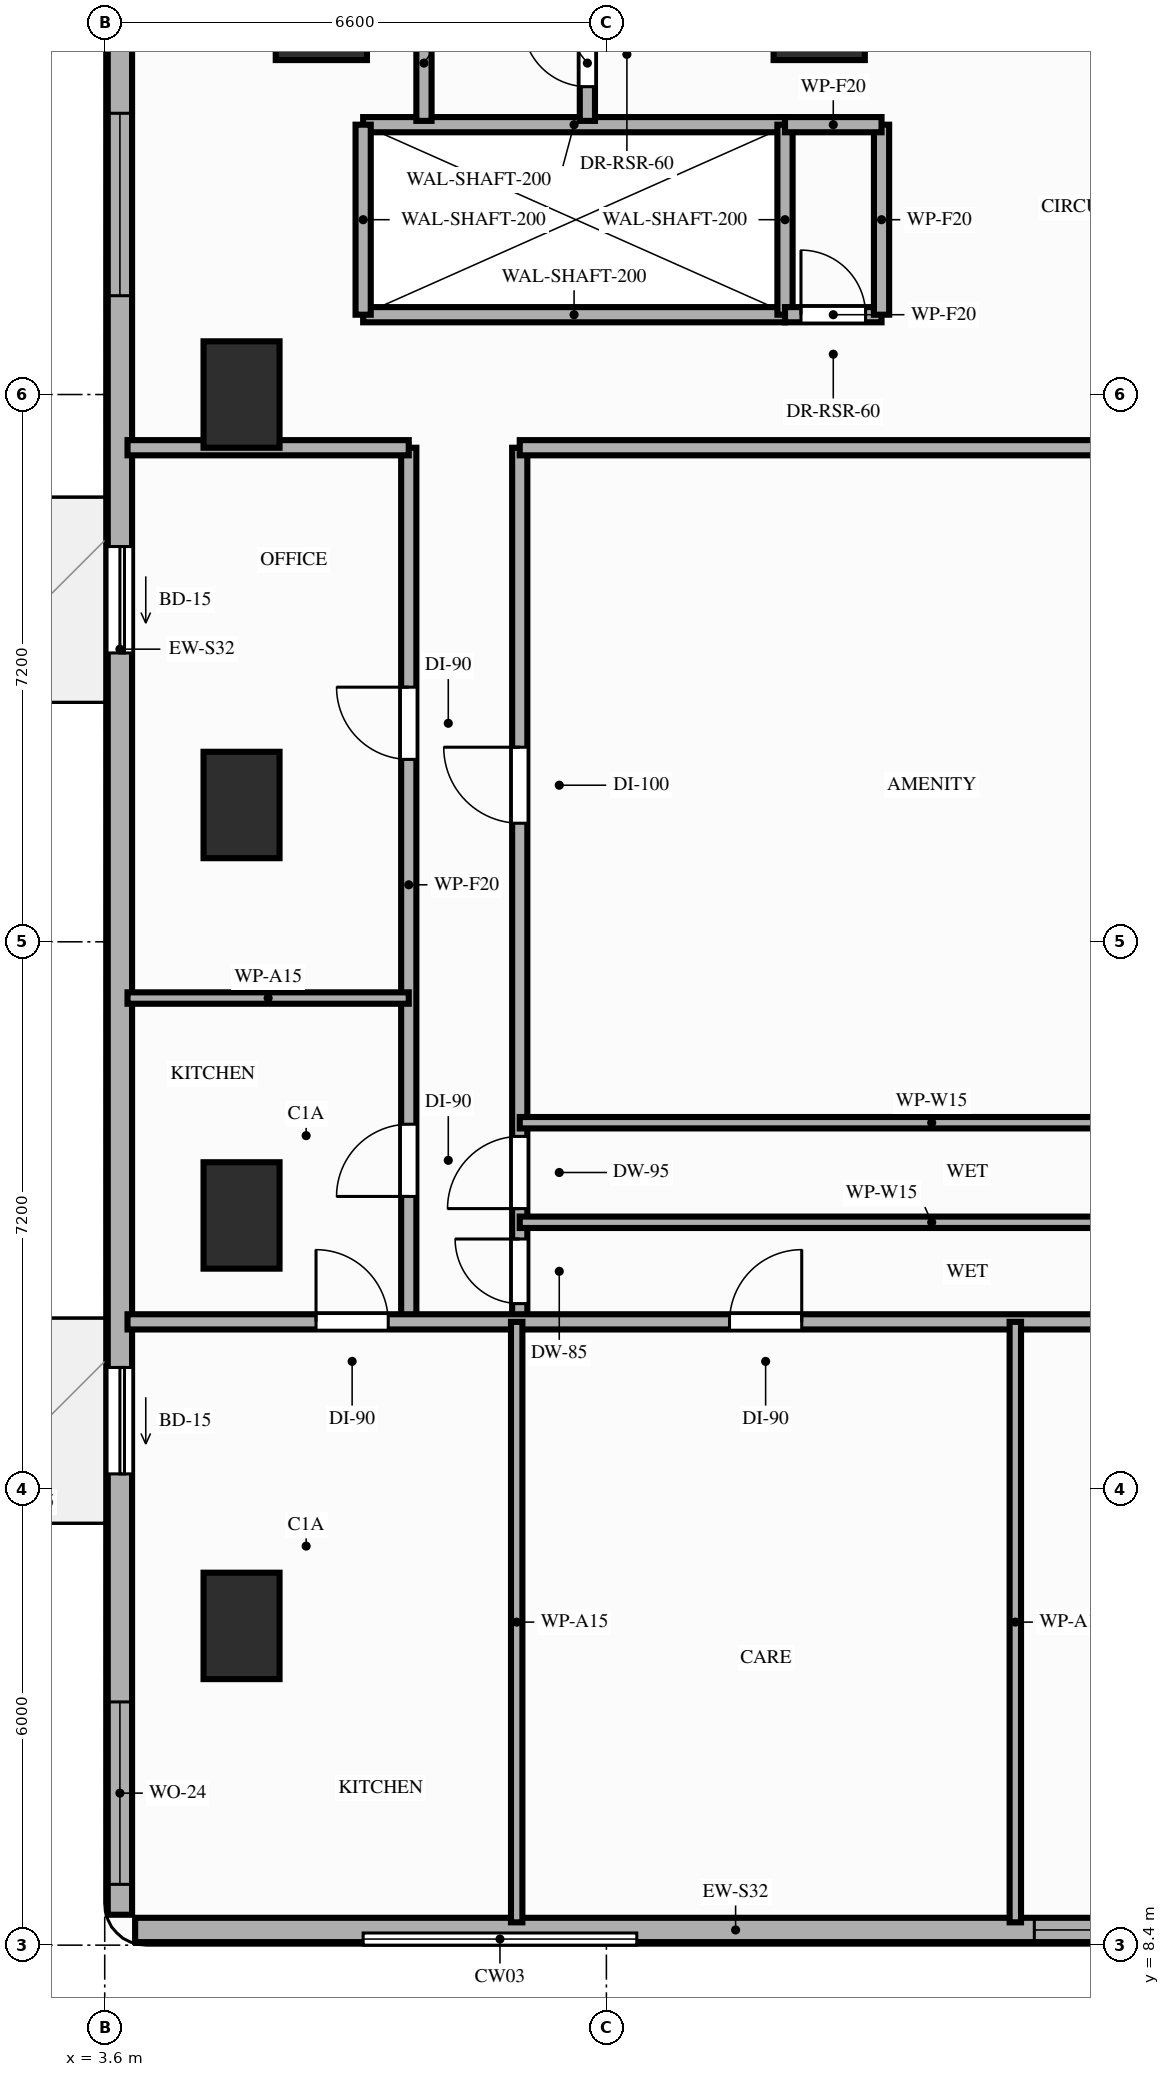
"""IFC4 building model, lengths in metres.
Left out: names, types, materials, properties, quantities, classifications, styles, units other than length and angle.
Written with IfcOpenShell. Run it as: python <this file> out.ifc"""

import sys

from ifc_helpers import new_model, si_unit, direction, frame, frame_2d, origin, origin_2d, place, context, subcontext, project, spatial, rectangle, extrude, element, fill, save


model = new_model("IFC4")
c1 = context("Model", 3, precision=1e-05, world=origin(), true_north=direction((0.0, 1.0)))
c2 = subcontext(c1, "Body", "Model", "MODEL_VIEW")
j1 = project(units=[si_unit("LENGTHUNIT", "METRE"), si_unit("PLANEANGLEUNIT", "RADIAN")], contexts=[c1])
p1 = place(None, origin())
s1 = spatial("IfcSite", under=j1, at=p1, CompositionType="ELEMENT")
p2 = place(p1, origin())
s2 = spatial("IfcBuilding", under=s1, at=p2, CompositionType="ELEMENT")
p3 = place(p2, frame((0.0, 0.0, 59.6)))
s3 = spatial("IfcBuildingStorey", under=s2, at=p3, CompositionType="ELEMENT", Elevation=59.6)
for number, where, z_axis, x_axis in (
    (1, (6.45, 33.8, 0.0), (0.0, 0.0, 1.0), (1.0, 0.0, 0.0)),
    (2, (13.0, 33.8, 0.0), (0.0, 0.0, 1.0), (1.0, 0.0, 0.0)),
):
    element("IfcColumn", number, at=place(p3, frame(where, z_axis=z_axis, x_axis=x_axis)), inside=s3, PredefinedType="COLUMN", context=c2, shape_type="SweptSolid", body=[
        extrude(rectangle(XDim=1.2, YDim=1.2, at=origin_2d()), origin(), (0.0, 0.0, 1.0), 3.2),
    ])
for number, where, z_axis, x_axis in (
    (3, (5.4, 12.6, 0.0), (0.0, 0.0, 1.0), (1.0, 0.0, 0.0)),
    (4, (5.4, 18.0, 0.0), (0.0, 0.0, 1.0), (1.0, 0.0, 0.0)),
    (5, (5.4, 23.4, 0.0), (0.0, 0.0, 1.0), (1.0, 0.0, 0.0)),
    (6, (5.4, 28.8, 0.0), (0.0, 0.0, 1.0), (1.0, 0.0, 0.0)),
):
    element("IfcColumn", number, at=place(p3, frame(where, z_axis=z_axis, x_axis=x_axis)), inside=s3, PredefinedType="COLUMN", context=c2, shape_type="SweptSolid", body=[
        extrude(rectangle(XDim=1.0, YDim=1.4, at=origin_2d()), origin(), (0.0, 0.0, 1.0), 3.2),
    ])
p4 = place(p3, frame((4.0, 8.6, 0.0), z_axis=(0.0, 0.0, 1.0), x_axis=(1.0, 0.0, 0.0)))
e7 = element("IfcWall", 7, at=p4, inside=s3, PredefinedType="STANDARD", context=c2, shape_type="SweptSolid", body=[
    extrude(rectangle(XDim=15.8, YDim=0.32, at=frame_2d((7.9, 0.0))), origin(), (0.0, 0.0, 1.0), 3.02),
])
p5 = place(p4, frame((11.83, 0.0, 0.85)))
e8 = element("IfcOpeningElement", 8, at=p5, cuts=e7, PredefinedType="OPENING", context=c2, shape_type="SweptSolid", body=[
    extrude(rectangle(XDim=2.4, YDim=1.8, at=frame_2d((1.2, 0.9))), frame((0.0, 0.17, 0.0), z_axis=(0.0, -1.0, 0.0), x_axis=(1.0, 0.0, 0.0)), (0.0, 0.0, 1.0), 0.34),
])
p6 = place(p3, frame((3.8, 42.1, 0.0), z_axis=(0.0, 0.0, 1.0), x_axis=(0.0, -1.0, 0.0)))
e9 = element("IfcWall", 9, at=p6, inside=s3, PredefinedType="STANDARD", context=c2, shape_type="SweptSolid", body=[
    extrude(rectangle(XDim=33.3, YDim=0.32, at=frame_2d((16.65, 0.0))), origin(), (0.0, 0.0, 1.0), 2.7),
])
p7 = place(p6, frame((26.1, 0.0, 0.0)))
e10 = element("IfcOpeningElement", 10, at=p7, cuts=e9, PredefinedType="OPENING", context=c2, shape_type="SweptSolid", body=[
    extrude(rectangle(XDim=1.4, YDim=2.1, at=frame_2d((0.7, 1.05))), frame((0.0, 0.17, 0.0), z_axis=(0.0, -1.0, 0.0), x_axis=(1.0, 0.0, 0.0)), (0.0, 0.0, 1.0), 0.34),
])
p8 = place(p6, frame((15.3, 0.0, 0.0)))
e11 = element("IfcOpeningElement", 11, at=p8, cuts=e9, PredefinedType="OPENING", context=c2, shape_type="SweptSolid", body=[
    extrude(rectangle(XDim=1.4, YDim=2.1, at=frame_2d((0.7, 1.05))), frame((0.0, 0.17, 0.0), z_axis=(0.0, -1.0, 0.0), x_axis=(1.0, 0.0, 0.0)), (0.0, 0.0, 1.0), 0.34),
])
p9 = place(p6, frame((30.5, 0.0, 0.85)))
e12 = element("IfcOpeningElement", 12, at=p9, cuts=e9, PredefinedType="OPENING", context=c2, shape_type="SweptSolid", body=[
    extrude(rectangle(XDim=2.4, YDim=1.6, at=frame_2d((1.2, 0.8))), frame((0.0, 0.17, 0.0), z_axis=(0.0, -1.0, 0.0), x_axis=(1.0, 0.0, 0.0)), (0.0, 0.0, 1.0), 0.34),
])
p10 = place(p6, frame((9.6, 0.0, 0.85)))
e13 = element("IfcOpeningElement", 13, at=p10, cuts=e9, PredefinedType="OPENING", context=c2, shape_type="SweptSolid", body=[
    extrude(rectangle(XDim=2.4, YDim=1.6, at=frame_2d((1.2, 0.8))), frame((0.0, 0.17, 0.0), z_axis=(0.0, -1.0, 0.0), x_axis=(1.0, 0.0, 0.0)), (0.0, 0.0, 1.0), 0.34),
])
p11 = place(p6, frame((3.5, 0.0, 0.85)))
e14 = element("IfcOpeningElement", 14, at=p11, cuts=e9, PredefinedType="OPENING", context=c2, shape_type="SweptSolid", body=[
    extrude(rectangle(XDim=2.4, YDim=1.6, at=frame_2d((1.2, 0.8))), frame((0.0, 0.17, 0.0), z_axis=(0.0, -1.0, 0.0), x_axis=(1.0, 0.0, 0.0)), (0.0, 0.0, 1.0), 0.34),
])
for number, where, z_axis, x_axis in (
    (15, (7.0, 29.85, 0.0), (0.0, 0.0, 1.0), (1.0, 0.0, 0.0)),
    (16, (7.0, 32.35, 0.0), (0.0, 0.0, 1.0), (1.0, 0.0, 0.0)),
):
    element("IfcWall", number, at=place(p3, frame(where, z_axis=z_axis, x_axis=x_axis)), inside=s3, PredefinedType="MOVABLE", context=c2, shape_type="SweptSolid", body=[
        extrude(rectangle(XDim=5.55, YDim=0.2, at=frame_2d((2.775, 0.0))), origin(), (0.0, 0.0, 1.0), 3.02),
    ])
for number, where, z_axis, x_axis in (
    (17, (7.0, 29.85, 0.0), (0.0, 0.0, 1.0), (0.0, 1.0, 0.0)),
    (18, (12.55, 29.85, 0.0), (0.0, 0.0, 1.0), (0.0, 1.0, 0.0)),
):
    element("IfcWall", number, at=place(p3, frame(where, z_axis=z_axis, x_axis=x_axis)), inside=s3, PredefinedType="MOVABLE", context=c2, shape_type="SweptSolid", body=[
        extrude(rectangle(XDim=2.5, YDim=0.2, at=frame_2d((1.25, 0.0))), origin(), (0.0, 0.0, 1.0), 3.02),
    ])
p12 = place(p3, frame((12.55, 29.85, 0.0), z_axis=(0.0, 0.0, 1.0), x_axis=(1.0, 0.0, 0.0)))
e19 = element("IfcWall", 19, at=p12, inside=s3, PredefinedType="PARTITIONING", context=c2, shape_type="SweptSolid", body=[
    extrude(rectangle(XDim=1.27, YDim=0.2, at=frame_2d((0.635, 0.0))), origin(), (0.0, 0.0, 1.0), 3.02),
])
p13 = place(p12, frame((0.21, 0.0, 0.0)))
e20 = element("IfcOpeningElement", 20, at=p13, cuts=e19, PredefinedType="OPENING", context=c2, shape_type="SweptSolid", body=[
    extrude(rectangle(XDim=0.85, YDim=2.05, at=frame_2d((0.425, 1.025))), frame((0.0, 0.11, 0.0), z_axis=(0.0, -1.0, 0.0), x_axis=(1.0, 0.0, 0.0)), (0.0, 0.0, 1.0), 0.22),
])
p14 = place(p3, frame((13.82, 29.85, 0.0), z_axis=(0.0, 0.0, 1.0), x_axis=(0.0, 1.0, 0.0)))
e21 = element("IfcWall", 21, at=p14, inside=s3, PredefinedType="PARTITIONING", context=c2, shape_type="SweptSolid", body=[
    extrude(rectangle(XDim=2.5, YDim=0.2, at=frame_2d((1.25, 0.0))), origin(), (0.0, 0.0, 1.0), 3.02),
])
p15 = place(p3, frame((12.55, 32.35, 0.0), z_axis=(0.0, 0.0, 1.0), x_axis=(1.0, 0.0, 0.0)))
e22 = element("IfcWall", 22, at=p15, inside=s3, PredefinedType="PARTITIONING", context=c2, shape_type="SweptSolid", body=[
    extrude(rectangle(XDim=1.27, YDim=0.2, at=frame_2d((0.635, 0.0))), origin(), (0.0, 0.0, 1.0), 3.02),
])
p16 = place(p3, frame((7.8, 32.4, 0.0), z_axis=(0.0, 0.0, 1.0), x_axis=(0.0, 1.0, 0.0)))
e23 = element("IfcWall", 23, at=p16, inside=s3, PredefinedType="PARTITIONING", context=c2, shape_type="SweptSolid", body=[
    extrude(rectangle(XDim=1.52, YDim=0.2, at=frame_2d((0.76, 0.0))), origin(), (0.0, 0.0, 1.0), 2.41),
])
p17 = place(p3, frame((9.95, 32.4, 0.0), z_axis=(0.0, 0.0, 1.0), x_axis=(0.0, 1.0, 0.0)))
e24 = element("IfcWall", 24, at=p17, inside=s3, PredefinedType="PARTITIONING", context=c2, shape_type="SweptSolid", body=[
    extrude(rectangle(XDim=1.52, YDim=0.2, at=frame_2d((0.76, 0.0))), origin(), (0.0, 0.0, 1.0), 2.41),
])
p18 = place(p17, frame((0.45, 0.0, 0.0)))
e25 = element("IfcOpeningElement", 25, at=p18, cuts=e24, PredefinedType="OPENING", context=c2, shape_type="SweptSolid", body=[
    extrude(rectangle(XDim=0.85, YDim=2.05, at=frame_2d((0.425, 1.025))), frame((0.0, 0.11, 0.0), z_axis=(0.0, -1.0, 0.0), x_axis=(1.0, 0.0, 0.0)), (0.0, 0.0, 1.0), 0.22),
])
p19 = place(p3, frame((7.6, 16.6, 0.0), z_axis=(0.0, 0.0, 1.0), x_axis=(0.0, 1.0, 0.0)))
e26 = element("IfcWall", 26, at=p19, inside=s3, PredefinedType="PARTITIONING", context=c2, shape_type="SweptSolid", body=[
    extrude(rectangle(XDim=11.5, YDim=0.2, at=frame_2d((5.75, 0.0))), origin(), (0.0, 0.0, 1.0), 2.41),
])
p20 = place(p19, frame((1.65, 0.0, 0.0)))
e27 = element("IfcOpeningElement", 27, at=p20, cuts=e26, PredefinedType="OPENING", context=c2, shape_type="SweptSolid", body=[
    extrude(rectangle(XDim=0.95, YDim=2.15, at=frame_2d((0.475, 1.075))), frame((0.0, 0.11, 0.0), z_axis=(0.0, -1.0, 0.0), x_axis=(1.0, 0.0, 0.0)), (0.0, 0.0, 1.0), 0.22),
])
p21 = place(p19, frame((7.4, 0.0, 0.0)))
e28 = element("IfcOpeningElement", 28, at=p21, cuts=e26, PredefinedType="OPENING", context=c2, shape_type="SweptSolid", body=[
    extrude(rectangle(XDim=0.95, YDim=2.15, at=frame_2d((0.475, 1.075))), frame((0.0, 0.11, 0.0), z_axis=(0.0, -1.0, 0.0), x_axis=(1.0, 0.0, 0.0)), (0.0, 0.0, 1.0), 0.22),
])
p22 = place(p3, frame((9.06, 16.6, 0.0), z_axis=(0.0, 0.0, 1.0), x_axis=(0.0, 1.0, 0.0)))
e29 = element("IfcWall", 29, at=p22, inside=s3, PredefinedType="PARTITIONING", context=c2, shape_type="SweptSolid", body=[
    extrude(rectangle(XDim=11.5, YDim=0.2, at=frame_2d((5.75, 0.0))), origin(), (0.0, 0.0, 1.0), 2.41),
])
p23 = place(p22, frame((0.24, 0.0, 0.0)))
e30 = element("IfcOpeningElement", 30, at=p23, cuts=e29, PredefinedType="OPENING", context=c2, shape_type="SweptSolid", body=[
    extrude(rectangle(XDim=0.85, YDim=2.1, at=frame_2d((0.425, 1.05))), frame((0.0, 0.11, 0.0), z_axis=(0.0, -1.0, 0.0), x_axis=(1.0, 0.0, 0.0)), (0.0, 0.0, 1.0), 0.22),
])
p24 = place(p22, frame((1.49, 0.0, 0.0)))
e31 = element("IfcOpeningElement", 31, at=p24, cuts=e29, PredefinedType="OPENING", context=c2, shape_type="SweptSolid", body=[
    extrude(rectangle(XDim=0.95, YDim=2.1, at=frame_2d((0.475, 1.05))), frame((0.0, 0.11, 0.0), z_axis=(0.0, -1.0, 0.0), x_axis=(1.0, 0.0, 0.0)), (0.0, 0.0, 1.0), 0.22),
])
p25 = place(p22, frame((6.56, 0.0, 0.0)))
e32 = element("IfcOpeningElement", 32, at=p25, cuts=e29, PredefinedType="OPENING", context=c2, shape_type="SweptSolid", body=[
    extrude(rectangle(XDim=1.0, YDim=2.15, at=frame_2d((0.5, 1.075))), frame((0.0, 0.11, 0.0), z_axis=(0.0, -1.0, 0.0), x_axis=(1.0, 0.0, 0.0)), (0.0, 0.0, 1.0), 0.22),
])
p26 = place(p3, frame((3.9, 16.6, 0.0), z_axis=(0.0, 0.0, 1.0), x_axis=(1.0, 0.0, 0.0)))
e33 = element("IfcWall", 33, at=p26, inside=s3, PredefinedType="PARTITIONING", context=c2, shape_type="SweptSolid", body=[
    extrude(rectangle(XDim=16.0, YDim=0.2, at=frame_2d((8.0, 0.0))), origin(), (0.0, 0.0, 1.0), 2.41),
])
p27 = place(p26, frame((2.48, 0.0, 0.0)))
e34 = element("IfcOpeningElement", 34, at=p27, cuts=e33, PredefinedType="OPENING", context=c2, shape_type="SweptSolid", body=[
    extrude(rectangle(XDim=0.95, YDim=2.15, at=frame_2d((0.475, 1.075))), frame((0.0, 0.11, 0.0), z_axis=(0.0, -1.0, 0.0), x_axis=(1.0, 0.0, 0.0)), (0.0, 0.0, 1.0), 0.22),
])
p28 = place(p26, frame((7.92, 0.0, 0.0)))
e35 = element("IfcOpeningElement", 35, at=p28, cuts=e33, PredefinedType="OPENING", context=c2, shape_type="SweptSolid", body=[
    extrude(rectangle(XDim=0.95, YDim=2.15, at=frame_2d((0.475, 1.075))), frame((0.0, 0.11, 0.0), z_axis=(0.0, -1.0, 0.0), x_axis=(1.0, 0.0, 0.0)), (0.0, 0.0, 1.0), 0.22),
])
p29 = place(p26, frame((13.36, 0.0, 0.0)))
e36 = element("IfcOpeningElement", 36, at=p29, cuts=e33, PredefinedType="OPENING", context=c2, shape_type="SweptSolid", body=[
    extrude(rectangle(XDim=0.95, YDim=2.15, at=frame_2d((0.475, 1.075))), frame((0.0, 0.11, 0.0), z_axis=(0.0, -1.0, 0.0), x_axis=(1.0, 0.0, 0.0)), (0.0, 0.0, 1.0), 0.22),
])
p30 = place(p3, frame((3.9, 28.1, 0.0), z_axis=(0.0, 0.0, 1.0), x_axis=(1.0, 0.0, 0.0)))
e37 = element("IfcWall", 37, at=p30, inside=s3, PredefinedType="PARTITIONING", context=c2, shape_type="SweptSolid", body=[
    extrude(rectangle(XDim=3.7, YDim=0.2, at=frame_2d((1.85, 0.0))), origin(), (0.0, 0.0, 1.0), 2.41),
])
p31 = place(p3, frame((9.06, 28.1, 0.0), z_axis=(0.0, 0.0, 1.0), x_axis=(1.0, 0.0, 0.0)))
e38 = element("IfcWall", 38, at=p31, inside=s3, PredefinedType="PARTITIONING", context=c2, shape_type="SweptSolid", body=[
    extrude(rectangle(XDim=10.84, YDim=0.2, at=frame_2d((5.42, 0.0))), origin(), (0.0, 0.0, 1.0), 2.41),
])
p32 = place(p3, frame((3.9, 20.86, 0.0), z_axis=(0.0, 0.0, 1.0), x_axis=(1.0, 0.0, 0.0)))
e39 = element("IfcWall", 39, at=p32, inside=s3, PredefinedType="PARTITIONING", context=c2, shape_type="SweptSolid", body=[
    extrude(rectangle(XDim=3.7, YDim=0.15, at=frame_2d((1.85, 0.0))), origin(), (0.0, 0.0, 1.0), 2.41),
])
for number, where, z_axis, x_axis in (
    (40, (9.02, 8.7, 0.0), (0.0, 0.0, 1.0), (0.0, 1.0, 0.0)),
    (41, (15.58, 8.7, 0.0), (0.0, 0.0, 1.0), (0.0, 1.0, 0.0)),
):
    element("IfcWall", number, at=place(p3, frame(where, z_axis=z_axis, x_axis=x_axis)), inside=s3, PredefinedType="PARTITIONING", context=c2, shape_type="SweptSolid", body=[
        extrude(rectangle(XDim=7.9, YDim=0.15, at=frame_2d((3.95, 0.0))), origin(), (0.0, 0.0, 1.0), 2.41),
    ])
for number, where, z_axis, x_axis in (
    (42, (9.06, 17.91, 0.0), (0.0, 0.0, 1.0), (1.0, 0.0, 0.0)),
    (43, (9.06, 19.22, 0.0), (0.0, 0.0, 1.0), (1.0, 0.0, 0.0)),
):
    element("IfcWall", number, at=place(p3, frame(where, z_axis=z_axis, x_axis=x_axis)), inside=s3, PredefinedType="PARTITIONING", context=c2, shape_type="SweptSolid", body=[
        extrude(rectangle(XDim=10.84, YDim=0.15, at=frame_2d((5.42, 0.0))), origin(), (0.0, 0.0, 1.0), 2.41),
    ])
p33 = place(p7, origin())
e44 = element("IfcDoor", 44, at=p33, inside=s3, OperationType="SLIDING_TO_RIGHT", PredefinedType="DOOR", context=c2, shape_type="SweptSolid", body=[
    extrude(rectangle(XDim=1.4, YDim=2.1, at=frame_2d((0.7, 1.05))), frame((0.0, 0.025, 0.0), z_axis=(0.0, -1.0, 0.0), x_axis=(1.0, 0.0, 0.0)), (0.0, 0.0, 1.0), 0.05),
])
fill(e10, e44)
p34 = place(p8, origin())
e45 = element("IfcDoor", 45, at=p34, inside=s3, OperationType="SLIDING_TO_RIGHT", PredefinedType="DOOR", context=c2, shape_type="SweptSolid", body=[
    extrude(rectangle(XDim=1.4, YDim=2.1, at=frame_2d((0.7, 1.05))), frame((0.0, 0.025, 0.0), z_axis=(0.0, -1.0, 0.0), x_axis=(1.0, 0.0, 0.0)), (0.0, 0.0, 1.0), 0.05),
])
fill(e11, e45)
p35 = place(p9, origin())
e46 = element("IfcWindow", 46, at=p35, inside=s3, PartitioningType="SINGLE_PANEL", PredefinedType="WINDOW", context=c2, shape_type="SweptSolid", body=[
    extrude(rectangle(XDim=2.4, YDim=1.6, at=frame_2d((1.2, 0.8))), frame((0.0, 0.03, 0.0), z_axis=(0.0, -1.0, 0.0), x_axis=(1.0, 0.0, 0.0)), (0.0, 0.0, 1.0), 0.06),
])
fill(e12, e46)
p36 = place(p10, origin())
e47 = element("IfcWindow", 47, at=p36, inside=s3, PartitioningType="SINGLE_PANEL", PredefinedType="WINDOW", context=c2, shape_type="SweptSolid", body=[
    extrude(rectangle(XDim=2.4, YDim=1.6, at=frame_2d((1.2, 0.8))), frame((0.0, 0.03, 0.0), z_axis=(0.0, -1.0, 0.0), x_axis=(1.0, 0.0, 0.0)), (0.0, 0.0, 1.0), 0.06),
])
fill(e13, e47)
p37 = place(p5, origin())
e48 = element("IfcWindow", 48, at=p37, inside=s3, PartitioningType="SINGLE_PANEL", PredefinedType="WINDOW", context=c2, shape_type="SweptSolid", body=[
    extrude(rectangle(XDim=2.4, YDim=1.8, at=frame_2d((1.2, 0.9))), frame((0.0, 0.03, 0.0), z_axis=(0.0, -1.0, 0.0), x_axis=(1.0, 0.0, 0.0)), (0.0, 0.0, 1.0), 0.06),
])
fill(e8, e48)
p38 = place(p13, origin())
e49 = element("IfcDoor", 49, at=p38, inside=s3, OperationType="SINGLE_SWING_LEFT", PredefinedType="DOOR", context=c2, shape_type="SweptSolid", body=[
    extrude(rectangle(XDim=0.85, YDim=2.05, at=frame_2d((0.425, 1.025))), frame((0.0, 0.025, 0.0), z_axis=(0.0, -1.0, 0.0), x_axis=(1.0, 0.0, 0.0)), (0.0, 0.0, 1.0), 0.05),
])
fill(e20, e49)
p39 = place(p18, origin())
e50 = element("IfcDoor", 50, at=p39, inside=s3, OperationType="SINGLE_SWING_RIGHT", PredefinedType="DOOR", context=c2, shape_type="SweptSolid", body=[
    extrude(rectangle(XDim=0.85, YDim=2.05, at=frame_2d((0.425, 1.025))), frame((0.0, 0.025, 0.0), z_axis=(0.0, -1.0, 0.0), x_axis=(1.0, 0.0, 0.0)), (0.0, 0.0, 1.0), 0.05),
])
fill(e25, e50)
p40 = place(p20, origin())
e51 = element("IfcDoor", 51, at=p40, inside=s3, OperationType="SINGLE_SWING_LEFT", PredefinedType="DOOR", context=c2, shape_type="SweptSolid", body=[
    extrude(rectangle(XDim=0.95, YDim=2.15, at=frame_2d((0.475, 1.075))), frame((0.0, 0.025, 0.0), z_axis=(0.0, -1.0, 0.0), x_axis=(1.0, 0.0, 0.0)), (0.0, 0.0, 1.0), 0.05),
])
fill(e27, e51)
p41 = place(p21, origin())
e52 = element("IfcDoor", 52, at=p41, inside=s3, OperationType="SINGLE_SWING_RIGHT", PredefinedType="DOOR", context=c2, shape_type="SweptSolid", body=[
    extrude(rectangle(XDim=0.95, YDim=2.15, at=frame_2d((0.475, 1.075))), frame((0.0, 0.025, 0.0), z_axis=(0.0, -1.0, 0.0), x_axis=(1.0, 0.0, 0.0)), (0.0, 0.0, 1.0), 0.05),
])
fill(e28, e52)
p42 = place(p27, origin())
e53 = element("IfcDoor", 53, at=p42, inside=s3, OperationType="SINGLE_SWING_LEFT", PredefinedType="DOOR", context=c2, shape_type="SweptSolid", body=[
    extrude(rectangle(XDim=0.95, YDim=2.15, at=frame_2d((0.475, 1.075))), frame((0.0, 0.025, 0.0), z_axis=(0.0, -1.0, 0.0), x_axis=(1.0, 0.0, 0.0)), (0.0, 0.0, 1.0), 0.05),
])
fill(e34, e53)
p43 = place(p28, origin())
e54 = element("IfcDoor", 54, at=p43, inside=s3, OperationType="SINGLE_SWING_RIGHT", PredefinedType="DOOR", context=c2, shape_type="SweptSolid", body=[
    extrude(rectangle(XDim=0.95, YDim=2.15, at=frame_2d((0.475, 1.075))), frame((0.0, 0.025, 0.0), z_axis=(0.0, -1.0, 0.0), x_axis=(1.0, 0.0, 0.0)), (0.0, 0.0, 1.0), 0.05),
])
fill(e35, e54)
p44 = place(p23, origin())
e55 = element("IfcDoor", 55, at=p44, inside=s3, OperationType="SINGLE_SWING_RIGHT", PredefinedType="DOOR", context=c2, shape_type="SweptSolid", body=[
    extrude(rectangle(XDim=0.85, YDim=2.1, at=frame_2d((0.425, 1.05))), frame((0.0, 0.025, 0.0), z_axis=(0.0, -1.0, 0.0), x_axis=(1.0, 0.0, 0.0)), (0.0, 0.0, 1.0), 0.05),
])
fill(e30, e55)
p45 = place(p24, origin())
e56 = element("IfcDoor", 56, at=p45, inside=s3, OperationType="SINGLE_SWING_LEFT", PredefinedType="DOOR", context=c2, shape_type="SweptSolid", body=[
    extrude(rectangle(XDim=0.95, YDim=2.1, at=frame_2d((0.475, 1.05))), frame((0.0, 0.025, 0.0), z_axis=(0.0, -1.0, 0.0), x_axis=(1.0, 0.0, 0.0)), (0.0, 0.0, 1.0), 0.05),
])
fill(e31, e56)
p46 = place(p25, origin())
e57 = element("IfcDoor", 57, at=p46, inside=s3, OperationType="SINGLE_SWING_RIGHT", PredefinedType="DOOR", context=c2, shape_type="SweptSolid", body=[
    extrude(rectangle(XDim=1.0, YDim=2.15, at=frame_2d((0.5, 1.075))), frame((0.0, 0.025, 0.0), z_axis=(0.0, -1.0, 0.0), x_axis=(1.0, 0.0, 0.0)), (0.0, 0.0, 1.0), 0.05),
])
fill(e32, e57)
save(model, sys.argv[1])
